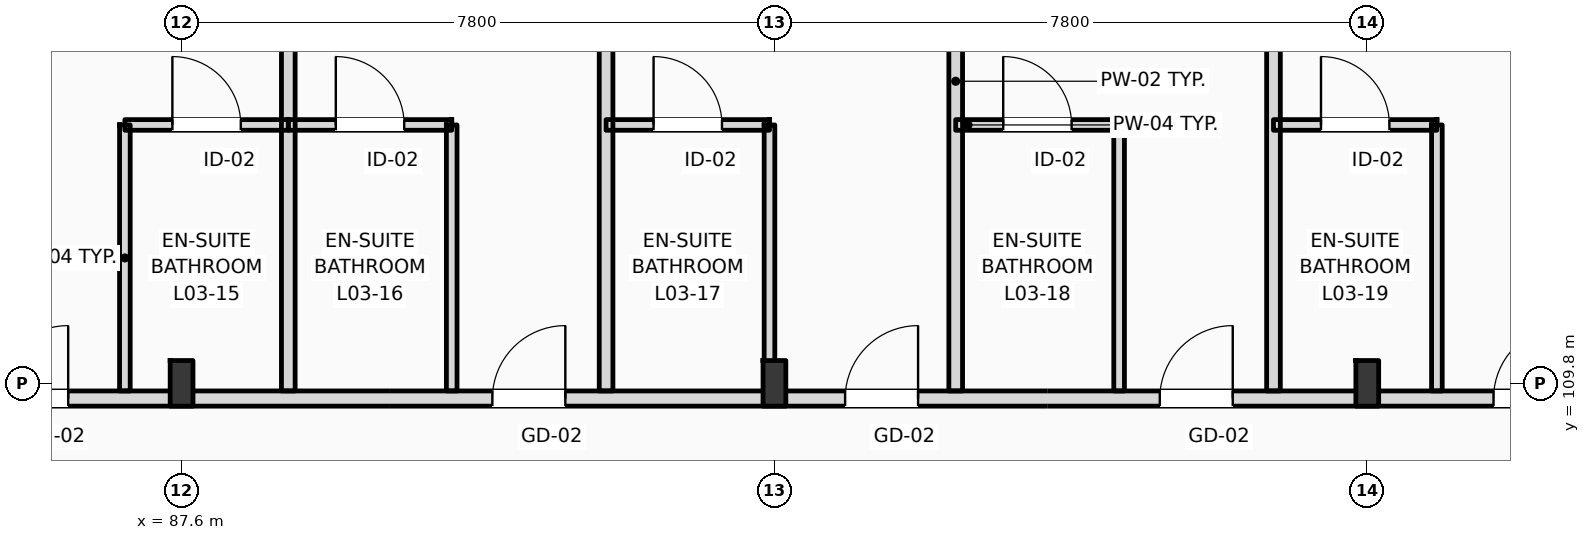
"""IFC4 building model, lengths in metres.
Left out: names, types, materials, properties, quantities, classifications, styles, units other than length and angle.
Written with IfcOpenShell. Run it as: python <this file> out.ifc"""

import sys

from ifc_helpers import new_model, si_unit, direction, frame, frame_2d, origin, origin_2d, place, context, subcontext, project, spatial, rectangle, i_section, extrude, element, fill, save


model = new_model("IFC4")
c1 = context("Model", 3, precision=1e-05, world=origin(), true_north=direction((0.0, 1.0)))
c2 = subcontext(c1, "Body", "Model", "MODEL_VIEW")
j1 = project(units=[si_unit("LENGTHUNIT", "METRE"), si_unit("PLANEANGLEUNIT", "RADIAN")], contexts=[c1])
p1 = place(None, origin())
s1 = spatial("IfcSite", under=j1, at=p1, CompositionType="ELEMENT")
p2 = place(p1, origin())
s2 = spatial("IfcBuilding", under=s1, at=p2, CompositionType="ELEMENT")
p3 = place(p2, frame((0.0, 0.0, 16.2)))
s3 = spatial("IfcBuildingStorey", under=s2, at=p3, CompositionType="ELEMENT", Elevation=16.2)
for number, where, z_axis, x_axis in (
    (1, (87.6, 109.8, 0.0), (0.0, 0.0, 1.0), (1.0, 0.0, 0.0)),
    (2, (95.4, 109.8, 0.0), (0.0, 0.0, 1.0), (1.0, 0.0, 0.0)),
    (3, (103.2, 109.8, 0.0), (0.0, 0.0, 1.0), (1.0, 0.0, 0.0)),
):
    element("IfcColumn", number, at=place(p3, frame(where, z_axis=z_axis, x_axis=x_axis)), inside=s3, PredefinedType="COLUMN", context=c2, shape_type="SweptSolid", body=[
        extrude(i_section(OverallWidth=0.3, OverallDepth=0.6, WebThickness=0.015, FlangeThickness=0.03, FilletRadius=0.027, at=origin_2d()), origin(), (0.0, 0.0, 1.0), 4.2),
    ])
p4 = place(p3, frame((10.65, 109.6, 0.0), z_axis=(0.0, 0.0, 1.0), x_axis=(1.0, 0.0, 0.0)))
e4 = element("IfcWall", 4, at=p4, inside=s3, PredefinedType="PARTITIONING", context=c2, shape_type="SweptSolid", body=[
    extrude(rectangle(XDim=109.21, YDim=0.2, at=frame_2d((54.605, 0.0))), origin(), (0.0, 0.0, 1.0), 3.36),
])
p5 = place(p4, frame((15.43, 0.0, 0.0)))
e5 = element("IfcOpeningElement", 5, at=p5, cuts=e4, PredefinedType="OPENING", context=c2, shape_type="SweptSolid", body=[
    extrude(rectangle(XDim=1.02, YDim=2.2, at=frame_2d((0.51, 1.1))), frame((0.0, 0.11, 0.0), z_axis=(0.0, -1.0, 0.0), x_axis=(1.0, 0.0, 0.0)), (0.0, 0.0, 1.0), 0.22),
])
p6 = place(p4, frame((19.537, 0.0, 0.0)))
e6 = element("IfcOpeningElement", 6, at=p6, cuts=e4, PredefinedType="OPENING", context=c2, shape_type="SweptSolid", body=[
    extrude(rectangle(XDim=1.02, YDim=2.2, at=frame_2d((0.51, 1.1))), frame((0.0, 0.11, 0.0), z_axis=(0.0, -1.0, 0.0), x_axis=(1.0, 0.0, 0.0)), (0.0, 0.0, 1.0), 0.22),
])
p7 = place(p4, frame((23.928, 0.0, 0.0)))
e7 = element("IfcOpeningElement", 7, at=p7, cuts=e4, PredefinedType="OPENING", context=c2, shape_type="SweptSolid", body=[
    extrude(rectangle(XDim=1.02, YDim=2.2, at=frame_2d((0.51, 1.1))), frame((0.0, 0.11, 0.0), z_axis=(0.0, -1.0, 0.0), x_axis=(1.0, 0.0, 0.0)), (0.0, 0.0, 1.0), 0.22),
])
p8 = place(p4, frame((26.169, 0.0, 0.0)))
e8 = element("IfcOpeningElement", 8, at=p8, cuts=e4, PredefinedType="OPENING", context=c2, shape_type="SweptSolid", body=[
    extrude(rectangle(XDim=1.02, YDim=2.2, at=frame_2d((0.51, 1.1))), frame((0.0, 0.11, 0.0), z_axis=(0.0, -1.0, 0.0), x_axis=(1.0, 0.0, 0.0)), (0.0, 0.0, 1.0), 0.22),
])
p9 = place(p4, frame((32.739, 0.0, 0.0)))
e9 = element("IfcOpeningElement", 9, at=p9, cuts=e4, PredefinedType="OPENING", context=c2, shape_type="SweptSolid", body=[
    extrude(rectangle(XDim=0.96, YDim=2.2, at=frame_2d((0.48, 1.1))), frame((0.0, 0.11, 0.0), z_axis=(0.0, -1.0, 0.0), x_axis=(1.0, 0.0, 0.0)), (0.0, 0.0, 1.0), 0.22),
])
p10 = place(p4, frame((34.98, 0.0, 0.0)))
e10 = element("IfcOpeningElement", 10, at=p10, cuts=e4, PredefinedType="OPENING", context=c2, shape_type="SweptSolid", body=[
    extrude(rectangle(XDim=0.96, YDim=2.2, at=frame_2d((0.48, 1.1))), frame((0.0, 0.11, 0.0), z_axis=(0.0, -1.0, 0.0), x_axis=(1.0, 0.0, 0.0)), (0.0, 0.0, 1.0), 0.22),
])
p11 = place(p4, frame((41.521, 0.0, 0.0)))
e11 = element("IfcOpeningElement", 11, at=p11, cuts=e4, PredefinedType="OPENING", context=c2, shape_type="SweptSolid", body=[
    extrude(rectangle(XDim=0.96, YDim=2.2, at=frame_2d((0.48, 1.1))), frame((0.0, 0.11, 0.0), z_axis=(0.0, -1.0, 0.0), x_axis=(1.0, 0.0, 0.0)), (0.0, 0.0, 1.0), 0.22),
])
p12 = place(p4, frame((43.512, 0.0, 0.0)))
e12 = element("IfcOpeningElement", 12, at=p12, cuts=e4, PredefinedType="OPENING", context=c2, shape_type="SweptSolid", body=[
    extrude(rectangle(XDim=0.96, YDim=2.2, at=frame_2d((0.48, 1.1))), frame((0.0, 0.11, 0.0), z_axis=(0.0, -1.0, 0.0), x_axis=(1.0, 0.0, 0.0)), (0.0, 0.0, 1.0), 0.22),
])
p13 = place(p4, frame((50.303, 0.0, 0.0)))
e13 = element("IfcOpeningElement", 13, at=p13, cuts=e4, PredefinedType="OPENING", context=c2, shape_type="SweptSolid", body=[
    extrude(rectangle(XDim=0.96, YDim=2.2, at=frame_2d((0.48, 1.1))), frame((0.0, 0.11, 0.0), z_axis=(0.0, -1.0, 0.0), x_axis=(1.0, 0.0, 0.0)), (0.0, 0.0, 1.0), 0.22),
])
p14 = place(p4, frame((54.944, 0.0, 0.0)))
e14 = element("IfcOpeningElement", 14, at=p14, cuts=e4, PredefinedType="OPENING", context=c2, shape_type="SweptSolid", body=[
    extrude(rectangle(XDim=0.96, YDim=2.2, at=frame_2d((0.48, 1.1))), frame((0.0, 0.11, 0.0), z_axis=(0.0, -1.0, 0.0), x_axis=(1.0, 0.0, 0.0)), (0.0, 0.0, 1.0), 0.22),
])
p15 = place(p4, frame((59.085, 0.0, 0.0)))
e15 = element("IfcOpeningElement", 15, at=p15, cuts=e4, PredefinedType="OPENING", context=c2, shape_type="SweptSolid", body=[
    extrude(rectangle(XDim=0.96, YDim=2.2, at=frame_2d((0.48, 1.1))), frame((0.0, 0.11, 0.0), z_axis=(0.0, -1.0, 0.0), x_axis=(1.0, 0.0, 0.0)), (0.0, 0.0, 1.0), 0.22),
])
p16 = place(p4, frame((63.476, 0.0, 0.0)))
e16 = element("IfcOpeningElement", 16, at=p16, cuts=e4, PredefinedType="OPENING", context=c2, shape_type="SweptSolid", body=[
    extrude(rectangle(XDim=0.96, YDim=2.2, at=frame_2d((0.48, 1.1))), frame((0.0, 0.11, 0.0), z_axis=(0.0, -1.0, 0.0), x_axis=(1.0, 0.0, 0.0)), (0.0, 0.0, 1.0), 0.22),
])
p17 = place(p4, frame((65.716, 0.0, 0.0)))
e17 = element("IfcOpeningElement", 17, at=p17, cuts=e4, PredefinedType="OPENING", context=c2, shape_type="SweptSolid", body=[
    extrude(rectangle(XDim=0.96, YDim=2.2, at=frame_2d((0.48, 1.1))), frame((0.0, 0.11, 0.0), z_axis=(0.0, -1.0, 0.0), x_axis=(1.0, 0.0, 0.0)), (0.0, 0.0, 1.0), 0.22),
])
p18 = place(p4, frame((72.257, 0.0, 0.0)))
e18 = element("IfcOpeningElement", 18, at=p18, cuts=e4, PredefinedType="OPENING", context=c2, shape_type="SweptSolid", body=[
    extrude(rectangle(XDim=0.96, YDim=2.2, at=frame_2d((0.48, 1.1))), frame((0.0, 0.11, 0.0), z_axis=(0.0, -1.0, 0.0), x_axis=(1.0, 0.0, 0.0)), (0.0, 0.0, 1.0), 0.22),
])
p19 = place(p4, frame((74.498, 0.0, 0.0)))
e19 = element("IfcOpeningElement", 19, at=p19, cuts=e4, PredefinedType="OPENING", context=c2, shape_type="SweptSolid", body=[
    extrude(rectangle(XDim=0.96, YDim=2.2, at=frame_2d((0.48, 1.1))), frame((0.0, 0.11, 0.0), z_axis=(0.0, -1.0, 0.0), x_axis=(1.0, 0.0, 0.0)), (0.0, 0.0, 1.0), 0.22),
])
p20 = place(p4, frame((81.039, 0.0, 0.0)))
e20 = element("IfcOpeningElement", 20, at=p20, cuts=e4, PredefinedType="OPENING", context=c2, shape_type="SweptSolid", body=[
    extrude(rectangle(XDim=0.96, YDim=2.2, at=frame_2d((0.48, 1.1))), frame((0.0, 0.11, 0.0), z_axis=(0.0, -1.0, 0.0), x_axis=(1.0, 0.0, 0.0)), (0.0, 0.0, 1.0), 0.22),
])
p21 = place(p4, frame((85.68, 0.0, 0.0)))
e21 = element("IfcOpeningElement", 21, at=p21, cuts=e4, PredefinedType="OPENING", context=c2, shape_type="SweptSolid", body=[
    extrude(rectangle(XDim=0.96, YDim=2.2, at=frame_2d((0.48, 1.1))), frame((0.0, 0.11, 0.0), z_axis=(0.0, -1.0, 0.0), x_axis=(1.0, 0.0, 0.0)), (0.0, 0.0, 1.0), 0.22),
])
p22 = place(p4, frame((89.82, 0.0, 0.0)))
e22 = element("IfcOpeningElement", 22, at=p22, cuts=e4, PredefinedType="OPENING", context=c2, shape_type="SweptSolid", body=[
    extrude(rectangle(XDim=0.96, YDim=2.2, at=frame_2d((0.48, 1.1))), frame((0.0, 0.11, 0.0), z_axis=(0.0, -1.0, 0.0), x_axis=(1.0, 0.0, 0.0)), (0.0, 0.0, 1.0), 0.22),
])
p23 = place(p4, frame((94.211, 0.0, 0.0)))
e23 = element("IfcOpeningElement", 23, at=p23, cuts=e4, PredefinedType="OPENING", context=c2, shape_type="SweptSolid", body=[
    extrude(rectangle(XDim=0.96, YDim=2.2, at=frame_2d((0.48, 1.1))), frame((0.0, 0.11, 0.0), z_axis=(0.0, -1.0, 0.0), x_axis=(1.0, 0.0, 0.0)), (0.0, 0.0, 1.0), 0.22),
])
p24 = place(p4, frame((98.602, 0.0, 0.0)))
e24 = element("IfcOpeningElement", 24, at=p24, cuts=e4, PredefinedType="OPENING", context=c2, shape_type="SweptSolid", body=[
    extrude(rectangle(XDim=0.96, YDim=2.2, at=frame_2d((0.48, 1.1))), frame((0.0, 0.11, 0.0), z_axis=(0.0, -1.0, 0.0), x_axis=(1.0, 0.0, 0.0)), (0.0, 0.0, 1.0), 0.22),
])
p25 = place(p4, frame((102.993, 0.0, 0.0)))
e25 = element("IfcOpeningElement", 25, at=p25, cuts=e4, PredefinedType="OPENING", context=c2, shape_type="SweptSolid", body=[
    extrude(rectangle(XDim=0.96, YDim=2.2, at=frame_2d((0.48, 1.1))), frame((0.0, 0.11, 0.0), z_axis=(0.0, -1.0, 0.0), x_axis=(1.0, 0.0, 0.0)), (0.0, 0.0, 1.0), 0.22),
])
p26 = place(p4, frame((105.269, 0.0, 0.0)))
e26 = element("IfcOpeningElement", 26, at=p26, cuts=e4, PredefinedType="OPENING", context=c2, shape_type="SweptSolid", body=[
    extrude(rectangle(XDim=0.96, YDim=2.2, at=frame_2d((0.48, 1.1))), frame((0.0, 0.11, 0.0), z_axis=(0.0, -1.0, 0.0), x_axis=(1.0, 0.0, 0.0)), (0.0, 0.0, 1.0), 0.22),
])
p27 = place(p4, frame((2.716, 0.0, 0.0)))
e27 = element("IfcOpeningElement", 27, at=p27, cuts=e4, PredefinedType="OPENING", context=c2, shape_type="SweptSolid", body=[
    extrude(rectangle(XDim=1.35, YDim=2.25, at=frame_2d((0.675, 1.125))), frame((0.0, 0.11, 0.0), z_axis=(0.0, -1.0, 0.0), x_axis=(1.0, 0.0, 0.0)), (0.0, 0.0, 1.0), 0.22),
])
p28 = place(p4, frame((6.65, 0.0, 0.0)))
e28 = element("IfcOpeningElement", 28, at=p28, cuts=e4, PredefinedType="OPENING", context=c2, shape_type="SweptSolid", body=[
    extrude(rectangle(XDim=1.35, YDim=2.25, at=frame_2d((0.675, 1.125))), frame((0.0, 0.11, 0.0), z_axis=(0.0, -1.0, 0.0), x_axis=(1.0, 0.0, 0.0)), (0.0, 0.0, 1.0), 0.22),
])
p29 = place(p4, frame((10.583, 0.0, 0.0)))
e29 = element("IfcOpeningElement", 29, at=p29, cuts=e4, PredefinedType="OPENING", context=c2, shape_type="SweptSolid", body=[
    extrude(rectangle(XDim=1.35, YDim=2.25, at=frame_2d((0.675, 1.125))), frame((0.0, 0.11, 0.0), z_axis=(0.0, -1.0, 0.0), x_axis=(1.0, 0.0, 0.0)), (0.0, 0.0, 1.0), 0.22),
])
p30 = place(p3, frame((89.004, 109.7, 0.0), z_axis=(0.0, 0.0, 1.0), x_axis=(0.0, 1.0, 0.0)))
e30 = element("IfcWall", 30, at=p30, inside=s3, PredefinedType="PARTITIONING", context=c2, shape_type="SweptSolid", body=[
    extrude(rectangle(XDim=8.15, YDim=0.18, at=frame_2d((4.075, 0.0))), origin(), (0.0, 0.0, 1.0), 3.92),
])
p31 = place(p3, frame((86.854, 109.7, 0.0), z_axis=(0.0, 0.0, 1.0), x_axis=(0.0, 1.0, 0.0)))
e31 = element("IfcWall", 31, at=p31, inside=s3, PredefinedType="PARTITIONING", context=c2, shape_type="SweptSolid", body=[
    extrude(rectangle(XDim=3.5, YDim=0.14, at=frame_2d((1.75, 0.0))), origin(), (0.0, 0.0, 1.0), 3.92),
])
p32 = place(p3, frame((86.854, 113.2, 0.0), z_axis=(0.0, 0.0, 1.0), x_axis=(1.0, 0.0, 0.0)))
e32 = element("IfcWall", 32, at=p32, inside=s3, PredefinedType="PARTITIONING", context=c2, shape_type="SweptSolid", body=[
    extrude(rectangle(XDim=2.15, YDim=0.14, at=frame_2d((1.075, 0.0))), origin(), (0.0, 0.0, 1.0), 3.92),
])
p33 = place(p32, frame((0.625, 0.0, 0.0)))
e33 = element("IfcOpeningElement", 33, at=p33, cuts=e32, PredefinedType="OPENING", context=c2, shape_type="SweptSolid", body=[
    extrude(rectangle(XDim=0.9, YDim=2.1, at=frame_2d((0.45, 1.05))), frame((0.0, 0.08, 0.0), z_axis=(0.0, -1.0, 0.0), x_axis=(1.0, 0.0, 0.0)), (0.0, 0.0, 1.0), 0.16),
])
p34 = place(p3, frame((93.185, 109.7, 0.0), z_axis=(0.0, 0.0, 1.0), x_axis=(0.0, 1.0, 0.0)))
e34 = element("IfcWall", 34, at=p34, inside=s3, PredefinedType="PARTITIONING", context=c2, shape_type="SweptSolid", body=[
    extrude(rectangle(XDim=8.15, YDim=0.18, at=frame_2d((4.075, 0.0))), origin(), (0.0, 0.0, 1.0), 3.92),
])
p35 = place(p3, frame((91.154, 109.7, 0.0), z_axis=(0.0, 0.0, 1.0), x_axis=(0.0, 1.0, 0.0)))
e35 = element("IfcWall", 35, at=p35, inside=s3, PredefinedType="PARTITIONING", context=c2, shape_type="SweptSolid", body=[
    extrude(rectangle(XDim=3.5, YDim=0.14, at=frame_2d((1.75, 0.0))), origin(), (0.0, 0.0, 1.0), 3.92),
])
p36 = place(p3, frame((89.004, 113.2, 0.0), z_axis=(0.0, 0.0, 1.0), x_axis=(1.0, 0.0, 0.0)))
e36 = element("IfcWall", 36, at=p36, inside=s3, PredefinedType="PARTITIONING", context=c2, shape_type="SweptSolid", body=[
    extrude(rectangle(XDim=2.15, YDim=0.14, at=frame_2d((1.075, 0.0))), origin(), (0.0, 0.0, 1.0), 3.92),
])
p37 = place(p36, frame((0.625, 0.0, 0.0)))
e37 = element("IfcOpeningElement", 37, at=p37, cuts=e36, PredefinedType="OPENING", context=c2, shape_type="SweptSolid", body=[
    extrude(rectangle(XDim=0.9, YDim=2.1, at=frame_2d((0.45, 1.05))), frame((0.0, 0.08, 0.0), z_axis=(0.0, -1.0, 0.0), x_axis=(1.0, 0.0, 0.0)), (0.0, 0.0, 1.0), 0.16),
])
p38 = place(p3, frame((97.785, 109.7, 0.0), z_axis=(0.0, 0.0, 1.0), x_axis=(0.0, 1.0, 0.0)))
e38 = element("IfcWall", 38, at=p38, inside=s3, PredefinedType="PARTITIONING", context=c2, shape_type="SweptSolid", body=[
    extrude(rectangle(XDim=8.15, YDim=0.18, at=frame_2d((4.075, 0.0))), origin(), (0.0, 0.0, 1.0), 3.61),
])
p39 = place(p3, frame((95.335, 109.7, 0.0), z_axis=(0.0, 0.0, 1.0), x_axis=(0.0, 1.0, 0.0)))
e39 = element("IfcWall", 39, at=p39, inside=s3, PredefinedType="PARTITIONING", context=c2, shape_type="SweptSolid", body=[
    extrude(rectangle(XDim=3.5, YDim=0.14, at=frame_2d((1.75, 0.0))), origin(), (0.0, 0.0, 1.0), 3.51),
])
p40 = place(p3, frame((93.185, 113.2, 0.0), z_axis=(0.0, 0.0, 1.0), x_axis=(1.0, 0.0, 0.0)))
e40 = element("IfcWall", 40, at=p40, inside=s3, PredefinedType="PARTITIONING", context=c2, shape_type="SweptSolid", body=[
    extrude(rectangle(XDim=2.15, YDim=0.14, at=frame_2d((1.075, 0.0))), origin(), (0.0, 0.0, 1.0), 3.92),
])
p41 = place(p40, frame((0.625, 0.0, 0.0)))
e41 = element("IfcOpeningElement", 41, at=p41, cuts=e40, PredefinedType="OPENING", context=c2, shape_type="SweptSolid", body=[
    extrude(rectangle(XDim=0.9, YDim=2.1, at=frame_2d((0.45, 1.05))), frame((0.0, 0.08, 0.0), z_axis=(0.0, -1.0, 0.0), x_axis=(1.0, 0.0, 0.0)), (0.0, 0.0, 1.0), 0.16),
])
p42 = place(p3, frame((101.966, 109.7, 0.0), z_axis=(0.0, 0.0, 1.0), x_axis=(0.0, 1.0, 0.0)))
e42 = element("IfcWall", 42, at=p42, inside=s3, PredefinedType="PARTITIONING", context=c2, shape_type="SweptSolid", body=[
    extrude(rectangle(XDim=8.15, YDim=0.18, at=frame_2d((4.075, 0.0))), origin(), (0.0, 0.0, 1.0), 3.92),
])
p43 = place(p3, frame((99.935, 109.7, 0.0), z_axis=(0.0, 0.0, 1.0), x_axis=(0.0, 1.0, 0.0)))
e43 = element("IfcWall", 43, at=p43, inside=s3, PredefinedType="PARTITIONING", context=c2, shape_type="SweptSolid", body=[
    extrude(rectangle(XDim=3.5, YDim=0.14, at=frame_2d((1.75, 0.0))), origin(), (0.0, 0.0, 1.0), 3.92),
])
p44 = place(p3, frame((97.785, 113.2, 0.0), z_axis=(0.0, 0.0, 1.0), x_axis=(1.0, 0.0, 0.0)))
e44 = element("IfcWall", 44, at=p44, inside=s3, PredefinedType="PARTITIONING", context=c2, shape_type="SweptSolid", body=[
    extrude(rectangle(XDim=2.15, YDim=0.14, at=frame_2d((1.075, 0.0))), origin(), (0.0, 0.0, 1.0), 3.92),
])
p45 = place(p44, frame((0.625, 0.0, 0.0)))
e45 = element("IfcOpeningElement", 45, at=p45, cuts=e44, PredefinedType="OPENING", context=c2, shape_type="SweptSolid", body=[
    extrude(rectangle(XDim=0.9, YDim=2.1, at=frame_2d((0.45, 1.05))), frame((0.0, 0.08, 0.0), z_axis=(0.0, -1.0, 0.0), x_axis=(1.0, 0.0, 0.0)), (0.0, 0.0, 1.0), 0.16),
])
p46 = place(p3, frame((104.116, 109.7, 0.0), z_axis=(0.0, 0.0, 1.0), x_axis=(0.0, 1.0, 0.0)))
e46 = element("IfcWall", 46, at=p46, inside=s3, PredefinedType="PARTITIONING", context=c2, shape_type="SweptSolid", body=[
    extrude(rectangle(XDim=3.5, YDim=0.14, at=frame_2d((1.75, 0.0))), origin(), (0.0, 0.0, 1.0), 3.92),
])
p47 = place(p3, frame((101.966, 113.2, 0.0), z_axis=(0.0, 0.0, 1.0), x_axis=(1.0, 0.0, 0.0)))
e47 = element("IfcWall", 47, at=p47, inside=s3, PredefinedType="PARTITIONING", context=c2, shape_type="SweptSolid", body=[
    extrude(rectangle(XDim=2.15, YDim=0.14, at=frame_2d((1.075, 0.0))), origin(), (0.0, 0.0, 1.0), 3.92),
])
p48 = place(p47, frame((0.625, 0.0, 0.0)))
e48 = element("IfcOpeningElement", 48, at=p48, cuts=e47, PredefinedType="OPENING", context=c2, shape_type="SweptSolid", body=[
    extrude(rectangle(XDim=0.9, YDim=2.1, at=frame_2d((0.45, 1.05))), frame((0.0, 0.08, 0.0), z_axis=(0.0, -1.0, 0.0), x_axis=(1.0, 0.0, 0.0)), (0.0, 0.0, 1.0), 0.16),
])
p49 = place(p19, origin())
e49 = element("IfcDoor", 49, at=p49, inside=s3, OperationType="SINGLE_SWING_RIGHT", PredefinedType="DOOR", context=c2, shape_type="SweptSolid", body=[
    extrude(rectangle(XDim=0.96, YDim=2.2, at=frame_2d((0.48, 1.1))), frame((0.0, 0.025, 0.0), z_axis=(0.0, -1.0, 0.0), x_axis=(1.0, 0.0, 0.0)), (0.0, 0.0, 1.0), 0.05),
])
fill(e19, e49)
p50 = place(p33, origin())
e50 = element("IfcDoor", 50, at=p50, inside=s3, OperationType="SINGLE_SWING_LEFT", PredefinedType="DOOR", context=c2, shape_type="SweptSolid", body=[
    extrude(rectangle(XDim=0.9, YDim=2.1, at=frame_2d((0.45, 1.05))), frame((0.0, 0.025, 0.0), z_axis=(0.0, -1.0, 0.0), x_axis=(1.0, 0.0, 0.0)), (0.0, 0.0, 1.0), 0.05),
])
fill(e33, e50)
p51 = place(p20, origin())
e51 = element("IfcDoor", 51, at=p51, inside=s3, OperationType="SINGLE_SWING_RIGHT", PredefinedType="DOOR", context=c2, shape_type="SweptSolid", body=[
    extrude(rectangle(XDim=0.96, YDim=2.2, at=frame_2d((0.48, 1.1))), frame((0.0, 0.025, 0.0), z_axis=(0.0, -1.0, 0.0), x_axis=(1.0, 0.0, 0.0)), (0.0, 0.0, 1.0), 0.05),
])
fill(e20, e51)
p52 = place(p37, origin())
e52 = element("IfcDoor", 52, at=p52, inside=s3, OperationType="SINGLE_SWING_LEFT", PredefinedType="DOOR", context=c2, shape_type="SweptSolid", body=[
    extrude(rectangle(XDim=0.9, YDim=2.1, at=frame_2d((0.45, 1.05))), frame((0.0, 0.025, 0.0), z_axis=(0.0, -1.0, 0.0), x_axis=(1.0, 0.0, 0.0)), (0.0, 0.0, 1.0), 0.05),
])
fill(e37, e52)
p53 = place(p21, origin())
e53 = element("IfcDoor", 53, at=p53, inside=s3, OperationType="SINGLE_SWING_RIGHT", PredefinedType="DOOR", context=c2, shape_type="SweptSolid", body=[
    extrude(rectangle(XDim=0.96, YDim=2.2, at=frame_2d((0.48, 1.1))), frame((0.0, 0.025, 0.0), z_axis=(0.0, -1.0, 0.0), x_axis=(1.0, 0.0, 0.0)), (0.0, 0.0, 1.0), 0.05),
])
fill(e21, e53)
p54 = place(p41, origin())
e54 = element("IfcDoor", 54, at=p54, inside=s3, OperationType="SINGLE_SWING_LEFT", PredefinedType="DOOR", context=c2, shape_type="SweptSolid", body=[
    extrude(rectangle(XDim=0.9, YDim=2.1, at=frame_2d((0.45, 1.05))), frame((0.0, 0.025, 0.0), z_axis=(0.0, -1.0, 0.0), x_axis=(1.0, 0.0, 0.0)), (0.0, 0.0, 1.0), 0.05),
])
fill(e41, e54)
p55 = place(p22, origin())
e55 = element("IfcDoor", 55, at=p55, inside=s3, OperationType="SINGLE_SWING_RIGHT", PredefinedType="DOOR", context=c2, shape_type="SweptSolid", body=[
    extrude(rectangle(XDim=0.96, YDim=2.2, at=frame_2d((0.48, 1.1))), frame((0.0, 0.025, 0.0), z_axis=(0.0, -1.0, 0.0), x_axis=(1.0, 0.0, 0.0)), (0.0, 0.0, 1.0), 0.05),
])
fill(e22, e55)
p56 = place(p45, origin())
e56 = element("IfcDoor", 56, at=p56, inside=s3, OperationType="SINGLE_SWING_LEFT", PredefinedType="DOOR", context=c2, shape_type="SweptSolid", body=[
    extrude(rectangle(XDim=0.9, YDim=2.1, at=frame_2d((0.45, 1.05))), frame((0.0, 0.025, 0.0), z_axis=(0.0, -1.0, 0.0), x_axis=(1.0, 0.0, 0.0)), (0.0, 0.0, 1.0), 0.05),
])
fill(e45, e56)
p57 = place(p23, origin())
e57 = element("IfcDoor", 57, at=p57, inside=s3, OperationType="SINGLE_SWING_RIGHT", PredefinedType="DOOR", context=c2, shape_type="SweptSolid", body=[
    extrude(rectangle(XDim=0.96, YDim=2.2, at=frame_2d((0.48, 1.1))), frame((0.0, 0.025, 0.0), z_axis=(0.0, -1.0, 0.0), x_axis=(1.0, 0.0, 0.0)), (0.0, 0.0, 1.0), 0.05),
])
fill(e23, e57)
p58 = place(p48, origin())
e58 = element("IfcDoor", 58, at=p58, inside=s3, OperationType="SINGLE_SWING_LEFT", PredefinedType="DOOR", context=c2, shape_type="SweptSolid", body=[
    extrude(rectangle(XDim=0.9, YDim=2.1, at=frame_2d((0.45, 1.05))), frame((0.0, 0.025, 0.0), z_axis=(0.0, -1.0, 0.0), x_axis=(1.0, 0.0, 0.0)), (0.0, 0.0, 1.0), 0.05),
])
fill(e48, e58)
save(model, sys.argv[1])
